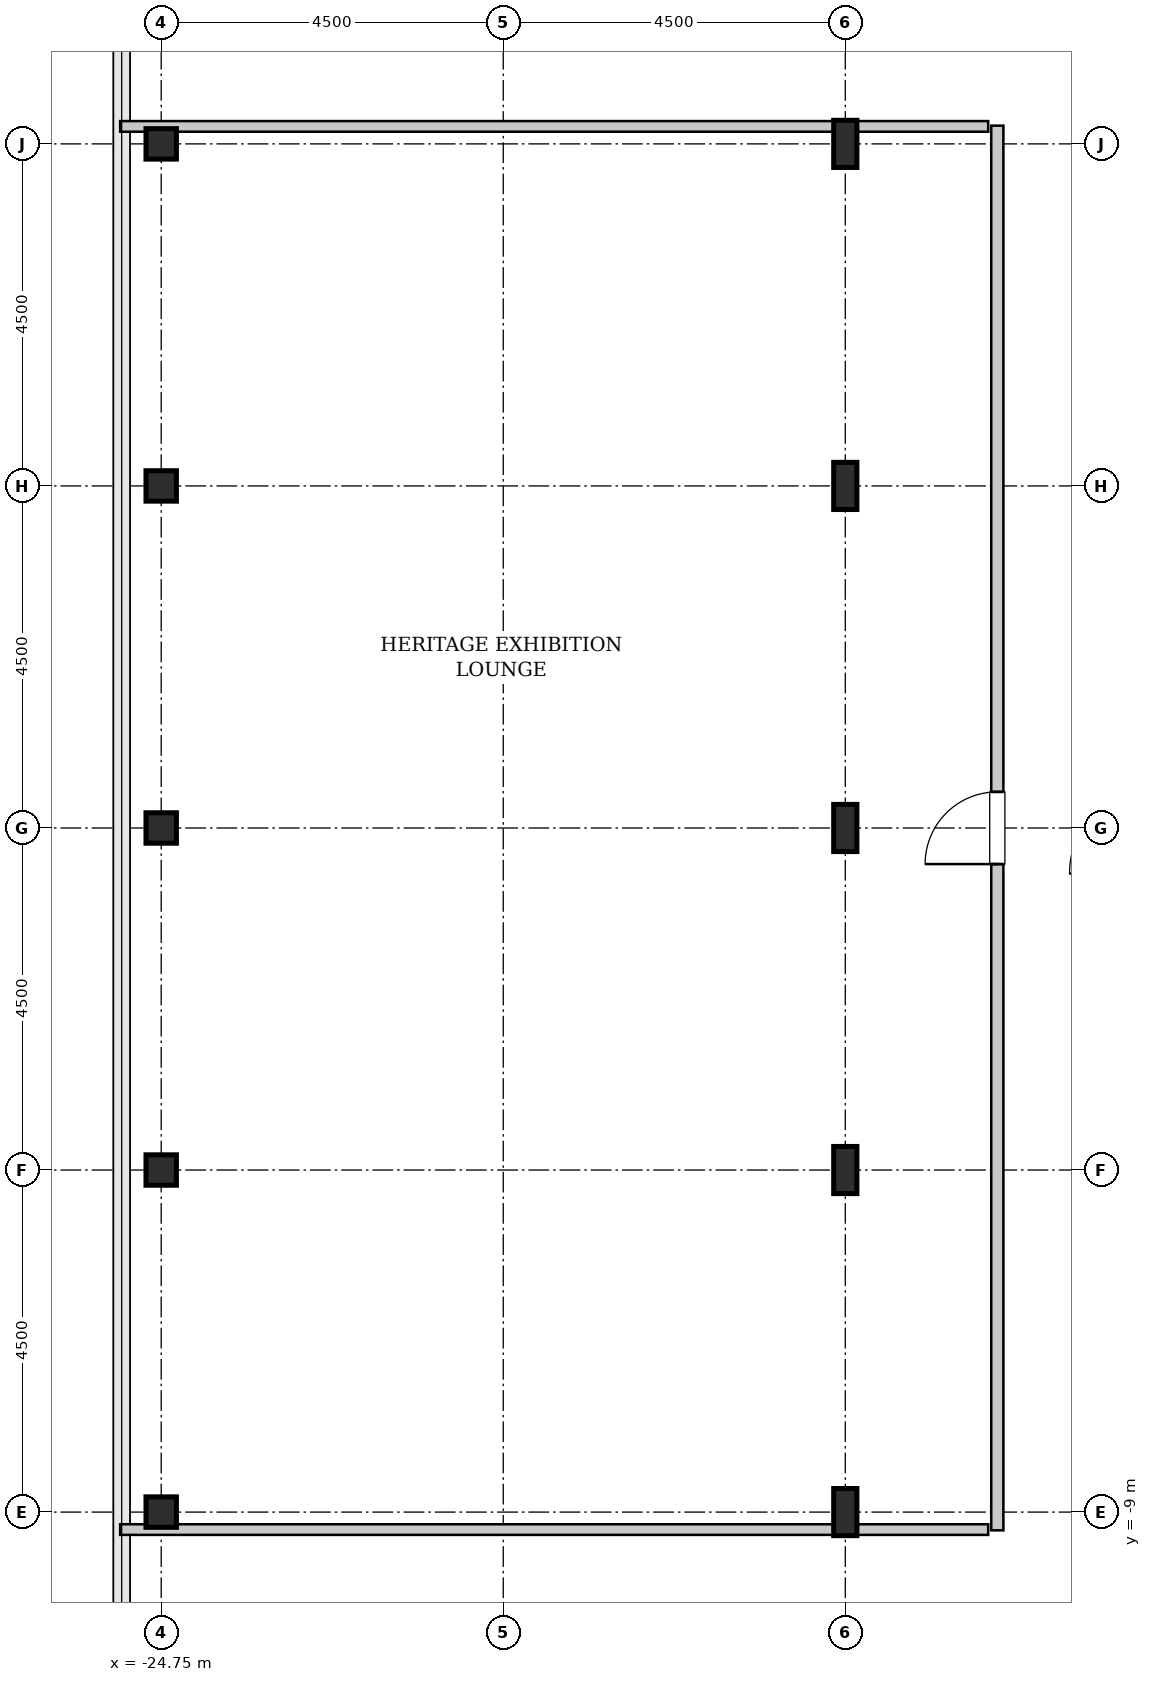
"""IFC4 building model, lengths in metres.
Left out: names, types, materials, properties, quantities, classifications, styles, units other than length and angle.
Written with IfcOpenShell. Run it as: python <this file> out.ifc"""

import sys

from ifc_helpers import new_model, si_unit, direction, frame, frame_2d, origin, origin_2d, place, context, subcontext, project, spatial, rectangle, hollow_rectangle, i_section, extrude, source, transform, mapped, element, fill, save


model = new_model("IFC4")
c1 = context("Model", 3, precision=1e-05, world=origin(), true_north=direction((0.0, 1.0)))
c2 = subcontext(c1, "Body", "Model", "MODEL_VIEW")
j1 = project(units=[si_unit("LENGTHUNIT", "METRE"), si_unit("PLANEANGLEUNIT", "RADIAN")], contexts=[c1])
p1 = place(None, origin())
s1 = spatial("IfcSite", under=j1, at=p1, CompositionType="ELEMENT")
p2 = place(p1, origin())
s2 = spatial("IfcBuilding", under=s1, at=p2, CompositionType="ELEMENT")
p3 = place(p2, frame((0.0, 0.0, 349.0)))
s3 = spatial("IfcBuildingStorey", under=s2, at=p3, CompositionType="ELEMENT", Elevation=349.0)
m1 = source(origin(), c2, "Body", "SweptSolid", [
    extrude(hollow_rectangle(XDim=0.4, YDim=0.4, WallThickness=0.02, InnerFilletRadius=0.02, OuterFilletRadius=0.04, at=origin_2d()), origin(), (0.0, 0.0, 1.0), 4.8),
])
for number, where, z_axis, x_axis in (
    (1, (-24.75, -9.0, 0.0), (0.0, 0.0, 1.0), (1.0, 0.0, 0.0)),
    (2, (-24.75, -4.5, 0.0), (0.0, 0.0, 1.0), (1.0, 0.0, 0.0)),
    (3, (-24.75, 0.0, 0.0), (0.0, 0.0, 1.0), (1.0, 0.0, 0.0)),
    (4, (-24.75, 4.5, 0.0), (0.0, 0.0, 1.0), (1.0, 0.0, 0.0)),
    (5, (-24.75, 9.0, 0.0), (0.0, 0.0, 1.0), (1.0, 0.0, 0.0)),
):
    element("IfcColumn", number, at=place(p3, frame(where, z_axis=z_axis, x_axis=x_axis)), inside=s3, PredefinedType="COLUMN", context=c2, shape_type="MappedRepresentation", body=[
        mapped(m1, transform((0.0, 0.0, 0.0), x_axis=(1.0, 0.0, 0.0), y_axis=(0.0, 1.0, 0.0), z_axis=(0.0, 0.0, 1.0), scale=1.0)),
    ])
m2 = source(origin(), c2, "Body", "SweptSolid", [
    extrude(i_section(OverallWidth=0.305, OverallDepth=0.62, WebThickness=0.021, FlangeThickness=0.04, FilletRadius=0.027, at=origin_2d()), origin(), (0.0, 0.0, 1.0), 4.8),
])
for number, where, z_axis, x_axis in (
    (6, (-15.75, -9.0, 0.0), (0.0, 0.0, 1.0), (1.0, 0.0, 0.0)),
    (7, (-15.75, -4.5, 0.0), (0.0, 0.0, 1.0), (1.0, 0.0, 0.0)),
    (8, (-15.75, 0.0, 0.0), (0.0, 0.0, 1.0), (1.0, 0.0, 0.0)),
    (9, (-15.75, 4.5, 0.0), (0.0, 0.0, 1.0), (1.0, 0.0, 0.0)),
    (10, (-15.75, 9.0, 0.0), (0.0, 0.0, 1.0), (1.0, 0.0, 0.0)),
):
    element("IfcColumn", number, at=place(p3, frame(where, z_axis=z_axis, x_axis=x_axis)), inside=s3, PredefinedType="COLUMN", context=c2, shape_type="MappedRepresentation", body=[
        mapped(m2, transform((0.0, 0.0, 0.0), x_axis=(1.0, 0.0, 0.0), y_axis=(0.0, 1.0, 0.0), z_axis=(0.0, 0.0, 1.0), scale=1.0)),
    ])
m3 = source(origin(), c2, "Body", "SweptSolid", [
    extrude(rectangle(XDim=18.48, YDim=0.16, at=frame_2d((9.24, 0.0))), origin(), (0.0, 0.0, 1.0), 4.485),
])
p4 = place(p3, frame((-13.75, -9.24, 0.0), z_axis=(0.0, 0.0, 1.0), x_axis=(0.0, 1.0, 0.0)))
e11 = element("IfcWall", 11, at=p4, inside=s3, PredefinedType="PARTITIONING", context=c2, shape_type="MappedRepresentation", body=[
    mapped(m3, transform((0.0, 0.0, 0.0), x_axis=(1.0, 0.0, 0.0), y_axis=(0.0, 1.0, 0.0), z_axis=(0.0, 0.0, 1.0), scale=1.0)),
])
p5 = place(p4, frame((8.765, 0.0, 0.0)))
e12 = element("IfcOpeningElement", 12, at=p5, cuts=e11, PredefinedType="OPENING", context=c2, shape_type="SweptSolid", body=[
    extrude(rectangle(XDim=0.95, YDim=2.1, at=frame_2d((0.475, 1.05))), frame((0.0, 0.09, 0.0), z_axis=(0.0, -1.0, 0.0), x_axis=(1.0, 0.0, 0.0)), (0.0, 0.0, 1.0), 0.18),
])
m4 = source(origin(), c2, "Body", "SweptSolid", [
    extrude(rectangle(XDim=11.42, YDim=0.14, at=frame_2d((5.71, 0.0))), origin(), (0.0, 0.0, 1.0), 3.925),
])
for number, where, z_axis, x_axis in (
    (13, (-25.29, -9.23, 0.0), (0.0, 0.0, 1.0), (1.0, 0.0, 0.0)),
    (14, (-25.29, 9.23, 0.0), (0.0, 0.0, 1.0), (1.0, 0.0, 0.0)),
):
    element("IfcWall", number, at=place(p3, frame(where, z_axis=z_axis, x_axis=x_axis)), inside=s3, PredefinedType="PARTITIONING", context=c2, shape_type="MappedRepresentation", body=[
        mapped(m4, transform((0.0, 0.0, 0.0), x_axis=(1.0, 0.0, 0.0), y_axis=(0.0, 1.0, 0.0), z_axis=(0.0, 0.0, 1.0), scale=1.0)),
    ])
m5 = source(origin(), c2, "Body", "SweptSolid", [
    extrude(rectangle(XDim=0.95, YDim=2.1, at=frame_2d((0.475, 1.05))), frame((0.0, 0.025, 0.0), z_axis=(0.0, -1.0, 0.0), x_axis=(1.0, 0.0, 0.0)), (0.0, 0.0, 1.0), 0.05),
])
p6 = place(p5, origin())
e15 = element("IfcDoor", 15, at=p6, inside=s3, OperationType="SINGLE_SWING_LEFT", PredefinedType="DOOR", context=c2, shape_type="MappedRepresentation", body=[
    mapped(m5, transform((0.0, 0.0, 0.0), x_axis=(1.0, 0.0, 0.0), y_axis=(0.0, 1.0, 0.0), z_axis=(0.0, 0.0, 1.0), scale=1.0)),
])
fill(e12, e15)
save(model, sys.argv[1])
